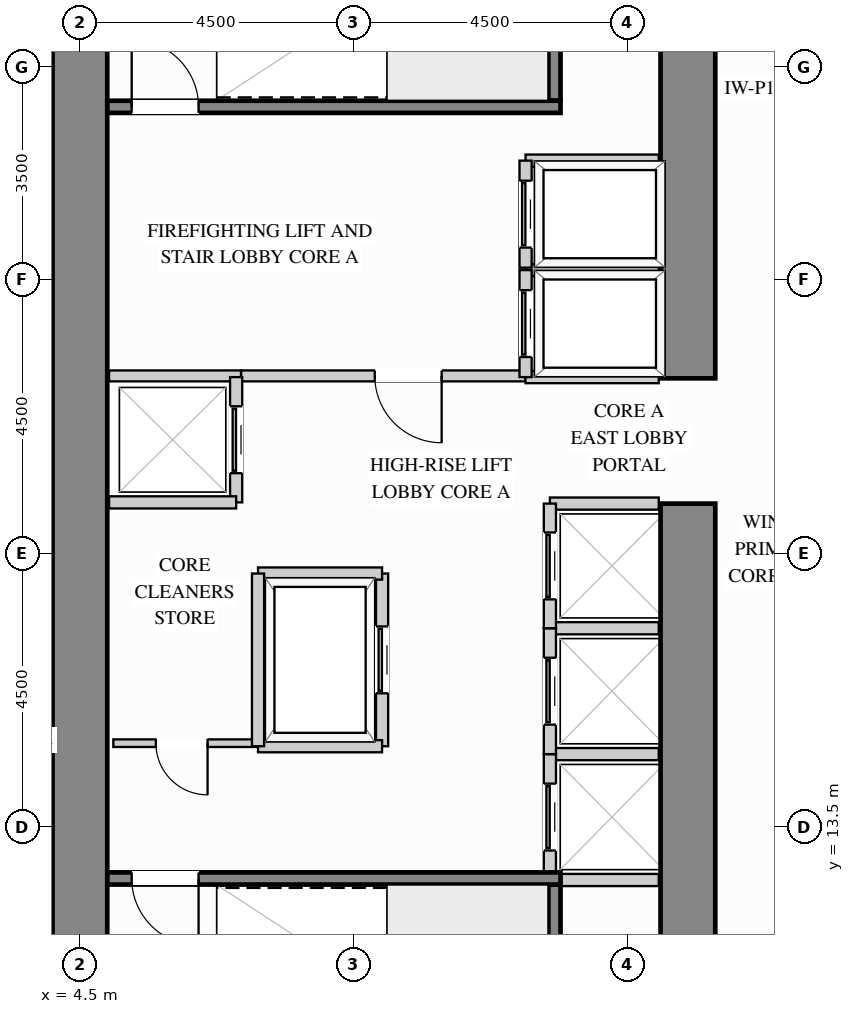
"""IFC4 building model, lengths in metres.
Left out: names, types, materials, properties, quantities, classifications, styles, units other than length and angle.
Written with IfcOpenShell. Run it as: python <this file> out.ifc"""

import sys

from ifc_helpers import new_model, si_unit, direction, frame, frame_2d, origin, place, context, subcontext, project, spatial, rectangle, extrude, source, transform, mapped, element, fill, save


model = new_model("IFC4")
c1 = context("Model", 3, precision=1e-05, world=origin(), true_north=direction((0.0, 1.0)))
c2 = subcontext(c1, "Body", "Model", "MODEL_VIEW")
j1 = project(units=[si_unit("LENGTHUNIT", "METRE"), si_unit("PLANEANGLEUNIT", "RADIAN")], contexts=[c1])
p1 = place(None, origin())
s1 = spatial("IfcSite", under=j1, at=p1, CompositionType="ELEMENT")
p2 = place(p1, origin())
s2 = spatial("IfcBuilding", under=s1, at=p2, CompositionType="ELEMENT")
p3 = place(p2, frame((0.0, 0.0, 47.7)))
s3 = spatial("IfcBuildingStorey", under=s2, at=p3, CompositionType="ELEMENT", Elevation=47.7)
m1 = source(origin(), c2, "Body", "SweptSolid", [
    extrude(rectangle(XDim=9.87, YDim=0.9, at=frame_2d((4.935, 0.0))), origin(), (0.0, 0.0, 1.0), 3.38),
])
p4 = place(p3, frame((14.5, 8.95, 0.0), z_axis=(0.0, 0.0, 1.0), x_axis=(0.0, 1.0, 0.0)))
e1 = element("IfcWall", 1, at=p4, inside=s3, PredefinedType="SHEAR", context=c2, shape_type="MappedRepresentation", body=[
    mapped(m1, transform((0.0, 0.0, 0.0), x_axis=(1.0, 0.0, 0.0), y_axis=(0.0, 1.0, 0.0), z_axis=(0.0, 0.0, 1.0))),
])
m2 = source(origin(), c2, "Body", "SweptSolid", [
    extrude(rectangle(XDim=8.17, YDim=0.9, at=frame_2d((4.085, 0.0))), origin(), (0.0, 0.0, 1.0), 3.38),
])
p5 = place(p3, frame((14.5, 20.88, 0.0), z_axis=(0.0, 0.0, 1.0), x_axis=(0.0, 1.0, 0.0)))
e2 = element("IfcWall", 2, at=p5, inside=s3, PredefinedType="SHEAR", context=c2, shape_type="MappedRepresentation", body=[
    mapped(m2, transform((0.0, 0.0, 0.0), x_axis=(1.0, 0.0, 0.0), y_axis=(0.0, 1.0, 0.0), z_axis=(0.0, 0.0, 1.0))),
])
m3 = source(origin(), c2, "Body", "SweptSolid", [
    extrude(rectangle(XDim=20.1, YDim=0.9, at=frame_2d((10.05, 0.0))), origin(), (0.0, 0.0, 1.0), 3.38),
])
p6 = place(p3, frame((4.5, 8.95, 0.0), z_axis=(0.0, 0.0, 1.0), x_axis=(0.0, 1.0, 0.0)))
e3 = element("IfcWall", 3, at=p6, inside=s3, PredefinedType="SHEAR", context=c2, shape_type="MappedRepresentation", body=[
    mapped(m3, transform((0.0, 0.0, 0.0), x_axis=(1.0, 0.0, 0.0), y_axis=(0.0, 1.0, 0.0), z_axis=(0.0, 0.0, 1.0))),
])
p7 = place(p3, frame((7.15, 20.92, 0.0), z_axis=(0.0, 0.0, 1.0), x_axis=(1.0, 0.0, 0.0)))
e4 = element("IfcWall", 4, at=p7, inside=s3, PredefinedType="PARTITIONING", context=c2, shape_type="SweptSolid", body=[
    extrude(rectangle(XDim=4.68, YDim=0.18, at=frame_2d((2.34, 0.0))), origin(), (0.0, 0.0, 1.0), 3.365),
])
p8 = place(p7, frame((2.2, 0.0, 0.0)))
e5 = element("IfcOpeningElement", 5, at=p8, cuts=e4, PredefinedType="OPENING", context=c2, shape_type="SweptSolid", body=[
    extrude(rectangle(XDim=1.1, YDim=2.15, at=frame_2d((0.55, 1.075))), frame((0.0, 0.1, 0.0), z_axis=(0.0, -1.0, 0.0), x_axis=(1.0, 0.0, 0.0)), (0.0, 0.0, 1.0), 0.2),
])
m4 = source(origin(), c2, "Body", "SweptSolid", [
    extrude(rectangle(XDim=2.17, YDim=0.18, at=frame_2d((1.085, 0.0))), origin(), (0.0, 0.0, 1.0), 3.365),
])
p9 = place(p3, frame((4.98, 20.92, 0.0), z_axis=(0.0, 0.0, 1.0), x_axis=(1.0, 0.0, 0.0)))
e6 = element("IfcWall", 6, at=p9, inside=s3, PredefinedType="PARTITIONING", context=c2, shape_type="MappedRepresentation", body=[
    mapped(m4, transform((0.0, 0.0, 0.0), x_axis=(1.0, 0.0, 0.0), y_axis=(0.0, 1.0, 0.0), z_axis=(0.0, 0.0, 1.0))),
])
p10 = place(p3, frame((5.05, 14.88, 0.0), z_axis=(0.0, 0.0, 1.0), x_axis=(1.0, 0.0, 0.0)))
e7 = element("IfcWall", 7, at=p10, inside=s3, PredefinedType="PARTITIONING", context=c2, shape_type="SweptSolid", body=[
    extrude(rectangle(XDim=2.35, YDim=0.125, at=frame_2d((1.175, 0.0))), origin(), (0.0, 0.0, 1.0), 3.365),
])
p11 = place(p10, frame((0.7, 0.0, 0.0)))
e8 = element("IfcOpeningElement", 8, at=p11, cuts=e7, PredefinedType="OPENING", context=c2, shape_type="SweptSolid", body=[
    extrude(rectangle(XDim=0.85, YDim=2.1, at=frame_2d((0.425, 1.05))), frame((0.0, 0.073, 0.0), z_axis=(0.0, -1.0, 0.0), x_axis=(1.0, 0.0, 0.0)), (0.0, 0.0, 1.0), 0.145),
])
m5 = source(origin(), c2, "Body", "SweptSolid", [
    extrude(rectangle(XDim=2.19, YDim=0.2, at=frame_2d((1.095, 0.0))), origin(), (0.0, 0.0, 1.0), 3.365),
])
for number, where, z_axis, x_axis in (
    (9, (11.83, 22.66, 0.0), (0.0, 0.0, 1.0), (1.0, 0.0, 0.0)),
    (10, (11.83, 20.9, 0.0), (0.0, 0.0, 1.0), (1.0, 0.0, 0.0)),
):
    element("IfcWall", number, at=place(p3, frame(where, z_axis=z_axis, x_axis=x_axis)), inside=s3, PredefinedType="PARTITIONING", context=c2, shape_type="MappedRepresentation", body=[
        mapped(m5, transform((0.0, 0.0, 0.0), x_axis=(1.0, 0.0, 0.0), y_axis=(0.0, 1.0, 0.0), z_axis=(0.0, 0.0, 1.0))),
    ])
p12 = place(p3, frame((11.83, 20.9, 0.0), z_axis=(0.0, 0.0, 1.0), x_axis=(0.0, 1.0, 0.0)))
e11 = element("IfcWall", 11, at=p12, inside=s3, PredefinedType="PARTITIONING", context=c2, shape_type="SweptSolid", body=[
    extrude(rectangle(XDim=1.76, YDim=0.2, at=frame_2d((0.88, 0.0))), origin(), (0.0, 0.0, 1.0), 3.365),
])
p13 = place(p12, frame((0.33, 0.0, 0.0)))
e12 = element("IfcOpeningElement", 12, at=p13, cuts=e11, PredefinedType="OPENING", context=c2, shape_type="SweptSolid", body=[
    extrude(rectangle(XDim=1.1, YDim=2.2, at=frame_2d((0.55, 1.1))), frame((0.0, 0.11, 0.0), z_axis=(0.0, -1.0, 0.0), x_axis=(1.0, 0.0, 0.0)), (0.0, 0.0, 1.0), 0.22),
])
p14 = place(p3, frame((11.83, 24.46, 0.0), z_axis=(0.0, 0.0, 1.0), x_axis=(1.0, 0.0, 0.0)))
e13 = element("IfcWall", 13, at=p14, inside=s3, PredefinedType="PARTITIONING", context=c2, shape_type="MappedRepresentation", body=[
    mapped(m5, transform((0.0, 0.0, 0.0), x_axis=(1.0, 0.0, 0.0), y_axis=(0.0, 1.0, 0.0), z_axis=(0.0, 0.0, 1.0))),
])
p15 = place(p3, frame((11.83, 22.7, 0.0), z_axis=(0.0, 0.0, 1.0), x_axis=(0.0, 1.0, 0.0)))
e14 = element("IfcWall", 14, at=p15, inside=s3, PredefinedType="PARTITIONING", context=c2, shape_type="SweptSolid", body=[
    extrude(rectangle(XDim=1.76, YDim=0.2, at=frame_2d((0.88, 0.0))), origin(), (0.0, 0.0, 1.0), 3.365),
])
p16 = place(p15, frame((0.33, 0.0, 0.0)))
e15 = element("IfcOpeningElement", 15, at=p16, cuts=e14, PredefinedType="OPENING", context=c2, shape_type="SweptSolid", body=[
    extrude(rectangle(XDim=1.1, YDim=2.2, at=frame_2d((0.55, 1.1))), frame((0.0, 0.11, 0.0), z_axis=(0.0, -1.0, 0.0), x_axis=(1.0, 0.0, 0.0)), (0.0, 0.0, 1.0), 0.22),
])
m6 = source(origin(), c2, "Body", "SweptSolid", [
    extrude(rectangle(XDim=1.79, YDim=0.2, at=frame_2d((0.895, 0.0))), origin(), (0.0, 0.0, 1.0), 3.365),
])
for number, where, z_axis, x_axis in (
    (16, (12.23, 14.7, 0.0), (0.0, 0.0, 1.0), (1.0, 0.0, 0.0)),
    (17, (12.23, 12.63, 0.0), (0.0, 0.0, 1.0), (1.0, 0.0, 0.0)),
):
    element("IfcWall", number, at=place(p3, frame(where, z_axis=z_axis, x_axis=x_axis)), inside=s3, PredefinedType="PARTITIONING", context=c2, shape_type="MappedRepresentation", body=[
        mapped(m6, transform((0.0, 0.0, 0.0), x_axis=(1.0, 0.0, 0.0), y_axis=(0.0, 1.0, 0.0), z_axis=(0.0, 0.0, 1.0))),
    ])
p17 = place(p3, frame((12.23, 12.63, 0.0), z_axis=(0.0, 0.0, 1.0), x_axis=(0.0, 1.0, 0.0)))
e18 = element("IfcWall", 18, at=p17, inside=s3, PredefinedType="PARTITIONING", context=c2, shape_type="SweptSolid", body=[
    extrude(rectangle(XDim=2.07, YDim=0.2, at=frame_2d((1.035, 0.0))), origin(), (0.0, 0.0, 1.0), 3.365),
])
p18 = place(p17, frame((0.485, 0.0, 0.0)))
e19 = element("IfcOpeningElement", 19, at=p18, cuts=e18, PredefinedType="OPENING", context=c2, shape_type="SweptSolid", body=[
    extrude(rectangle(XDim=1.1, YDim=2.2, at=frame_2d((0.55, 1.1))), frame((0.0, 0.11, 0.0), z_axis=(0.0, -1.0, 0.0), x_axis=(1.0, 0.0, 0.0)), (0.0, 0.0, 1.0), 0.22),
])
p19 = place(p3, frame((12.23, 16.77, 0.0), z_axis=(0.0, 0.0, 1.0), x_axis=(1.0, 0.0, 0.0)))
e20 = element("IfcWall", 20, at=p19, inside=s3, PredefinedType="PARTITIONING", context=c2, shape_type="MappedRepresentation", body=[
    mapped(m6, transform((0.0, 0.0, 0.0), x_axis=(1.0, 0.0, 0.0), y_axis=(0.0, 1.0, 0.0), z_axis=(0.0, 0.0, 1.0))),
])
p20 = place(p3, frame((12.23, 14.7, 0.0), z_axis=(0.0, 0.0, 1.0), x_axis=(0.0, 1.0, 0.0)))
e21 = element("IfcWall", 21, at=p20, inside=s3, PredefinedType="PARTITIONING", context=c2, shape_type="SweptSolid", body=[
    extrude(rectangle(XDim=2.07, YDim=0.2, at=frame_2d((1.035, 0.0))), origin(), (0.0, 0.0, 1.0), 3.365),
])
p21 = place(p20, frame((0.485, 0.0, 0.0)))
e22 = element("IfcOpeningElement", 22, at=p21, cuts=e21, PredefinedType="OPENING", context=c2, shape_type="SweptSolid", body=[
    extrude(rectangle(XDim=1.1, YDim=2.2, at=frame_2d((0.55, 1.1))), frame((0.0, 0.11, 0.0), z_axis=(0.0, -1.0, 0.0), x_axis=(1.0, 0.0, 0.0)), (0.0, 0.0, 1.0), 0.22),
])
p22 = place(p3, frame((12.23, 18.82, 0.0), z_axis=(0.0, 0.0, 1.0), x_axis=(1.0, 0.0, 0.0)))
e23 = element("IfcWall", 23, at=p22, inside=s3, PredefinedType="PARTITIONING", context=c2, shape_type="MappedRepresentation", body=[
    mapped(m6, transform((0.0, 0.0, 0.0), x_axis=(1.0, 0.0, 0.0), y_axis=(0.0, 1.0, 0.0), z_axis=(0.0, 0.0, 1.0))),
])
p23 = place(p3, frame((12.23, 16.77, 0.0), z_axis=(0.0, 0.0, 1.0), x_axis=(0.0, 1.0, 0.0)))
e24 = element("IfcWall", 24, at=p23, inside=s3, PredefinedType="PARTITIONING", context=c2, shape_type="SweptSolid", body=[
    extrude(rectangle(XDim=2.05, YDim=0.2, at=frame_2d((1.025, 0.0))), origin(), (0.0, 0.0, 1.0), 3.365),
])
p24 = place(p23, frame((0.475, 0.0, 0.0)))
e25 = element("IfcOpeningElement", 25, at=p24, cuts=e24, PredefinedType="OPENING", context=c2, shape_type="SweptSolid", body=[
    extrude(rectangle(XDim=1.1, YDim=2.2, at=frame_2d((0.55, 1.1))), frame((0.0, 0.11, 0.0), z_axis=(0.0, -1.0, 0.0), x_axis=(1.0, 0.0, 0.0)), (0.0, 0.0, 1.0), 0.22),
])
p25 = place(p3, frame((7.07, 18.84, 0.0), z_axis=(0.0, 0.0, 1.0), x_axis=(0.0, 1.0, 0.0)))
e26 = element("IfcWall", 26, at=p25, inside=s3, PredefinedType="PARTITIONING", context=c2, shape_type="SweptSolid", body=[
    extrude(rectangle(XDim=2.06, YDim=0.2, at=frame_2d((1.03, 0.0))), origin(), (0.0, 0.0, 1.0), 3.365),
])
p26 = place(p25, frame((0.48, 0.0, 0.0)))
e27 = element("IfcOpeningElement", 27, at=p26, cuts=e26, PredefinedType="OPENING", context=c2, shape_type="SweptSolid", body=[
    extrude(rectangle(XDim=1.1, YDim=2.2, at=frame_2d((0.55, 1.1))), frame((0.0, 0.11, 0.0), z_axis=(0.0, -1.0, 0.0), x_axis=(1.0, 0.0, 0.0)), (0.0, 0.0, 1.0), 0.22),
])
m7 = source(origin(), c2, "Body", "SweptSolid", [
    extrude(rectangle(XDim=2.09, YDim=0.2, at=frame_2d((1.045, 0.0))), origin(), (0.0, 0.0, 1.0), 3.365),
])
p27 = place(p3, frame((4.98, 18.84, 0.0), z_axis=(0.0, 0.0, 1.0), x_axis=(1.0, 0.0, 0.0)))
e28 = element("IfcWall", 28, at=p27, inside=s3, PredefinedType="PARTITIONING", context=c2, shape_type="MappedRepresentation", body=[
    mapped(m7, transform((0.0, 0.0, 0.0), x_axis=(1.0, 0.0, 0.0), y_axis=(0.0, 1.0, 0.0), z_axis=(0.0, 0.0, 1.0))),
])
p28 = place(p3, frame((9.47, 14.83, 0.0), z_axis=(0.0, 0.0, 1.0), x_axis=(0.0, 1.0, 0.0)))
e29 = element("IfcWall", 29, at=p28, inside=s3, PredefinedType="PARTITIONING", context=c2, shape_type="SweptSolid", body=[
    extrude(rectangle(XDim=2.84, YDim=0.2, at=frame_2d((1.42, 0.0))), origin(), (0.0, 0.0, 1.0), 3.365),
])
p29 = place(p28, frame((0.87, 0.0, 0.0)))
e30 = element("IfcOpeningElement", 30, at=p29, cuts=e29, PredefinedType="OPENING", context=c2, shape_type="SweptSolid", body=[
    extrude(rectangle(XDim=1.1, YDim=2.2, at=frame_2d((0.55, 1.1))), frame((0.0, 0.11, 0.0), z_axis=(0.0, -1.0, 0.0), x_axis=(1.0, 0.0, 0.0)), (0.0, 0.0, 1.0), 0.22),
])
m8 = source(origin(), c2, "Body", "SweptSolid", [
    extrude(rectangle(XDim=2.04, YDim=0.2, at=frame_2d((1.02, 0.0))), origin(), (0.0, 0.0, 1.0), 3.365),
])
for number, where, z_axis, x_axis in (
    (31, (7.43, 17.67, 0.0), (0.0, 0.0, 1.0), (1.0, 0.0, 0.0)),
    (32, (7.43, 14.83, 0.0), (0.0, 0.0, 1.0), (1.0, 0.0, 0.0)),
):
    element("IfcWall", number, at=place(p3, frame(where, z_axis=z_axis, x_axis=x_axis)), inside=s3, PredefinedType="PARTITIONING", context=c2, shape_type="MappedRepresentation", body=[
        mapped(m8, transform((0.0, 0.0, 0.0), x_axis=(1.0, 0.0, 0.0), y_axis=(0.0, 1.0, 0.0), z_axis=(0.0, 0.0, 1.0))),
    ])
m9 = source(origin(), c2, "Body", "SweptSolid", [
    extrude(rectangle(XDim=2.84, YDim=0.2, at=frame_2d((1.42, 0.0))), origin(), (0.0, 0.0, 1.0), 3.365),
])
p30 = place(p3, frame((7.43, 14.83, 0.0), z_axis=(0.0, 0.0, 1.0), x_axis=(0.0, 1.0, 0.0)))
e33 = element("IfcWall", 33, at=p30, inside=s3, PredefinedType="PARTITIONING", context=c2, shape_type="MappedRepresentation", body=[
    mapped(m9, transform((0.0, 0.0, 0.0), x_axis=(1.0, 0.0, 0.0), y_axis=(0.0, 1.0, 0.0), z_axis=(0.0, 0.0, 1.0))),
])
m10 = source(origin(), c2, "Body", "SweptSolid", [
    extrude(rectangle(XDim=3.603, YDim=0.2, at=frame_2d((1.802, 0.0))), origin(), (0.0, 0.0, 1.0), 3.38),
])
p31 = place(p3, frame((12.305, 8.952, 0.0), z_axis=(0.0, 0.0, 1.0), x_axis=(0.0, 1.0, 0.0)))
e34 = element("IfcWall", 34, at=p31, inside=s3, PredefinedType="SHEAR", context=c2, shape_type="MappedRepresentation", body=[
    mapped(m10, transform((0.0, 0.0, 0.0), x_axis=(1.0, 0.0, 0.0), y_axis=(0.0, 1.0, 0.0), z_axis=(0.0, 0.0, 1.0))),
])
p32 = place(p3, frame((4.952, 12.655, 0.0), z_axis=(0.0, 0.0, 1.0), x_axis=(1.0, 0.0, 0.0)))
e35 = element("IfcWall", 35, at=p32, inside=s3, PredefinedType="SHEAR", context=c2, shape_type="SweptSolid", body=[
    extrude(rectangle(XDim=7.453, YDim=0.2, at=frame_2d((3.727, 0.0))), origin(), (0.0, 0.0, 1.0), 3.38),
])
p33 = place(p32, frame((0.4, 0.0, 0.0)))
e36 = element("IfcOpeningElement", 36, at=p33, cuts=e35, PredefinedType="OPENING", context=c2, shape_type="SweptSolid", body=[
    extrude(rectangle(XDim=1.1, YDim=2.15, at=frame_2d((0.55, 1.075))), frame((0.0, 0.11, 0.0), z_axis=(0.0, -1.0, 0.0), x_axis=(1.0, 0.0, 0.0)), (0.0, 0.0, 1.0), 0.22),
])
p34 = place(p3, frame((12.305, 25.445, 0.0), z_axis=(0.0, 0.0, 1.0), x_axis=(0.0, 1.0, 0.0)))
e37 = element("IfcWall", 37, at=p34, inside=s3, PredefinedType="SHEAR", context=c2, shape_type="MappedRepresentation", body=[
    mapped(m10, transform((0.0, 0.0, 0.0), x_axis=(1.0, 0.0, 0.0), y_axis=(0.0, 1.0, 0.0), z_axis=(0.0, 0.0, 1.0))),
])
p35 = place(p3, frame((4.952, 25.345, 0.0), z_axis=(0.0, 0.0, 1.0), x_axis=(1.0, 0.0, 0.0)))
e38 = element("IfcWall", 38, at=p35, inside=s3, PredefinedType="SHEAR", context=c2, shape_type="SweptSolid", body=[
    extrude(rectangle(XDim=7.453, YDim=0.2, at=frame_2d((3.727, 0.0))), origin(), (0.0, 0.0, 1.0), 3.38),
])
p36 = place(p35, frame((0.4, 0.0, 0.0)))
e39 = element("IfcOpeningElement", 39, at=p36, cuts=e38, PredefinedType="OPENING", context=c2, shape_type="SweptSolid", body=[
    extrude(rectangle(XDim=1.1, YDim=2.15, at=frame_2d((0.55, 1.075))), frame((0.0, 0.11, 0.0), z_axis=(0.0, -1.0, 0.0), x_axis=(1.0, 0.0, 0.0)), (0.0, 0.0, 1.0), 0.22),
])
m11 = source(origin(), c2, "Body", "SweptSolid", [
    extrude(rectangle(XDim=1.1, YDim=2.15, at=frame_2d((0.55, 1.075))), frame((0.0, 0.025, 0.0), z_axis=(0.0, -1.0, 0.0), x_axis=(1.0, 0.0, 0.0)), (0.0, 0.0, 1.0), 0.05),
])
p37 = place(p8, origin())
e40 = element("IfcDoor", 40, at=p37, inside=s3, OperationType="SINGLE_SWING_RIGHT", PredefinedType="DOOR", context=c2, shape_type="MappedRepresentation", body=[
    mapped(m11, transform((0.0, 0.0, 0.0), x_axis=(1.0, 0.0, 0.0), y_axis=(0.0, 1.0, 0.0), z_axis=(0.0, 0.0, 1.0))),
])
fill(e5, e40)
m12 = source(origin(), c2, "Body", "SweptSolid", [
    extrude(rectangle(XDim=1.1, YDim=2.2, at=frame_2d((0.55, 1.1))), frame((0.0, 0.025, 0.0), z_axis=(0.0, -1.0, 0.0), x_axis=(1.0, 0.0, 0.0)), (0.0, 0.0, 1.0), 0.05),
])
p38 = place(p13, origin())
e41 = element("IfcDoor", 41, at=p38, inside=s3, OperationType="SLIDING_TO_LEFT", PredefinedType="DOOR", context=c2, shape_type="MappedRepresentation", body=[
    mapped(m12, transform((0.0, 0.0, 0.0), x_axis=(1.0, 0.0, 0.0), y_axis=(0.0, 1.0, 0.0), z_axis=(0.0, 0.0, 1.0))),
])
fill(e12, e41)
p39 = place(p16, origin())
e42 = element("IfcDoor", 42, at=p39, inside=s3, OperationType="SLIDING_TO_LEFT", PredefinedType="DOOR", context=c2, shape_type="MappedRepresentation", body=[
    mapped(m12, transform((0.0, 0.0, 0.0), x_axis=(1.0, 0.0, 0.0), y_axis=(0.0, 1.0, 0.0), z_axis=(0.0, 0.0, 1.0))),
])
fill(e15, e42)
p40 = place(p18, origin())
e43 = element("IfcDoor", 43, at=p40, inside=s3, OperationType="SLIDING_TO_LEFT", PredefinedType="DOOR", context=c2, shape_type="MappedRepresentation", body=[
    mapped(m12, transform((0.0, 0.0, 0.0), x_axis=(1.0, 0.0, 0.0), y_axis=(0.0, 1.0, 0.0), z_axis=(0.0, 0.0, 1.0))),
])
fill(e19, e43)
p41 = place(p21, origin())
e44 = element("IfcDoor", 44, at=p41, inside=s3, OperationType="SLIDING_TO_LEFT", PredefinedType="DOOR", context=c2, shape_type="MappedRepresentation", body=[
    mapped(m12, transform((0.0, 0.0, 0.0), x_axis=(1.0, 0.0, 0.0), y_axis=(0.0, 1.0, 0.0), z_axis=(0.0, 0.0, 1.0))),
])
fill(e22, e44)
p42 = place(p24, origin())
e45 = element("IfcDoor", 45, at=p42, inside=s3, OperationType="SLIDING_TO_LEFT", PredefinedType="DOOR", context=c2, shape_type="MappedRepresentation", body=[
    mapped(m12, transform((0.0, 0.0, 0.0), x_axis=(1.0, 0.0, 0.0), y_axis=(0.0, 1.0, 0.0), z_axis=(0.0, 0.0, 1.0))),
])
fill(e25, e45)
p43 = place(p26, origin())
e46 = element("IfcDoor", 46, at=p43, inside=s3, OperationType="SLIDING_TO_LEFT", PredefinedType="DOOR", context=c2, shape_type="MappedRepresentation", body=[
    mapped(m12, transform((0.0, 0.0, 0.0), x_axis=(1.0, 0.0, 0.0), y_axis=(0.0, 1.0, 0.0), z_axis=(0.0, 0.0, 1.0))),
])
fill(e27, e46)
p44 = place(p29, origin())
e47 = element("IfcDoor", 47, at=p44, inside=s3, OperationType="SLIDING_TO_LEFT", PredefinedType="DOOR", context=c2, shape_type="MappedRepresentation", body=[
    mapped(m12, transform((0.0, 0.0, 0.0), x_axis=(1.0, 0.0, 0.0), y_axis=(0.0, 1.0, 0.0), z_axis=(0.0, 0.0, 1.0))),
])
fill(e30, e47)
m13 = source(origin(), c2, "Body", "SweptSolid", [
    extrude(rectangle(XDim=0.85, YDim=2.1, at=frame_2d((0.425, 1.05))), frame((0.0, 0.025, 0.0), z_axis=(0.0, -1.0, 0.0), x_axis=(1.0, 0.0, 0.0)), (0.0, 0.0, 1.0), 0.05),
])
p45 = place(p11, origin())
e48 = element("IfcDoor", 48, at=p45, inside=s3, OperationType="SINGLE_SWING_RIGHT", PredefinedType="DOOR", context=c2, shape_type="MappedRepresentation", body=[
    mapped(m13, transform((0.0, 0.0, 0.0), x_axis=(1.0, 0.0, 0.0), y_axis=(0.0, 1.0, 0.0), z_axis=(0.0, 0.0, 1.0))),
])
fill(e8, e48)
m14 = source(origin(), c2, "Body", "SweptSolid", [
    extrude(rectangle(XDim=1.1, YDim=2.15, at=frame_2d((0.55, 1.075))), frame((0.0, 0.025, 0.0), z_axis=(0.0, -1.0, 0.0), x_axis=(1.0, 0.0, 0.0)), (0.0, 0.0, 1.0), 0.05),
])
p46 = place(p33, origin())
e49 = element("IfcDoor", 49, at=p46, inside=s3, OperationType="SINGLE_SWING_RIGHT", PredefinedType="DOOR", context=c2, shape_type="MappedRepresentation", body=[
    mapped(m14, transform((0.0, 0.0, 0.0), x_axis=(1.0, 0.0, 0.0), y_axis=(0.0, 1.0, 0.0), z_axis=(0.0, 0.0, 1.0))),
])
fill(e36, e49)
p47 = place(p36, origin())
e50 = element("IfcDoor", 50, at=p47, inside=s3, OperationType="SINGLE_SWING_LEFT", PredefinedType="DOOR", context=c2, shape_type="MappedRepresentation", body=[
    mapped(m14, transform((0.0, 0.0, 0.0), x_axis=(1.0, 0.0, 0.0), y_axis=(0.0, 1.0, 0.0), z_axis=(0.0, 0.0, 1.0))),
])
fill(e39, e50)
save(model, sys.argv[1])
